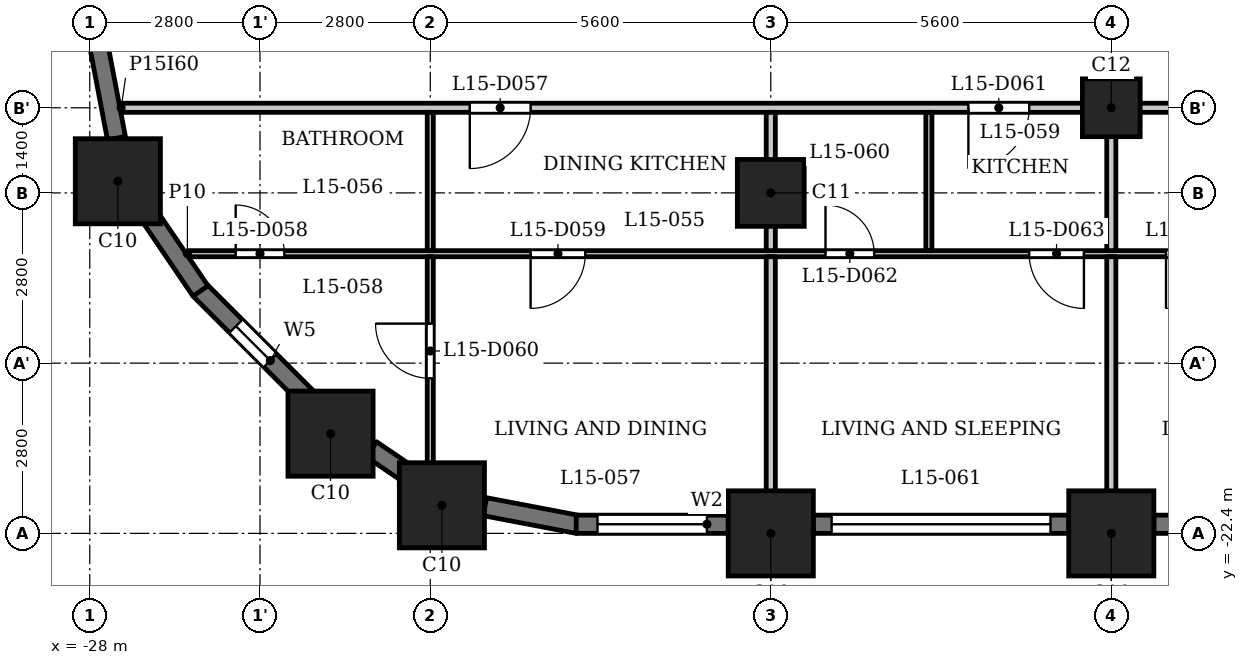
"""IFC4 building model, lengths in metres.
Left out: names, types, materials, properties, quantities, classifications, styles, units other than length and angle.
Written with IfcOpenShell. Run it as: python <this file> out.ifc"""

import sys

from ifc_helpers import new_model, si_unit, direction, frame, frame_2d, origin, origin_2d, place, context, subcontext, project, spatial, rectangle, extrude, element, fill, save


model = new_model("IFC4")
c1 = context("Model", 3, precision=1e-05, world=origin(), true_north=direction((0.0, 1.0)))
c2 = subcontext(c1, "Body", "Model", "MODEL_VIEW")
j1 = project(units=[si_unit("LENGTHUNIT", "METRE"), si_unit("PLANEANGLEUNIT", "RADIAN")], contexts=[c1])
p1 = place(None, origin())
s1 = spatial("IfcSite", under=j1, at=p1, CompositionType="ELEMENT")
p2 = place(p1, origin())
s2 = spatial("IfcBuilding", under=s1, at=p2, CompositionType="ELEMENT")
p3 = place(p2, frame((0.0, 0.0, 62.0)))
s3 = spatial("IfcBuildingStorey", under=s2, at=p3, CompositionType="ELEMENT", Elevation=62.0)
for number, where, z_axis, x_axis in (
    (1, (-22.209, -21.938, 0.0), (0.0, 0.0, 1.0), (1.0, 0.0, 0.0)),
    (2, (-16.8, -22.4, 0.0), (0.0, 0.0, 1.0), (1.0, 0.0, 0.0)),
    (3, (-11.2, -22.4, 0.0), (0.0, 0.0, 1.0), (1.0, 0.0, 0.0)),
    (4, (-27.538, -16.609, 0.0), (0.0, 0.0, 1.0), (1.0, 0.0, 0.0)),
    (5, (-24.04, -20.76, 0.0), (0.0, 0.0, 1.0), (1.0, 0.0, 0.0)),
):
    element("IfcColumn", number, at=place(p3, frame(where, z_axis=z_axis, x_axis=x_axis)), inside=s3, PredefinedType="COLUMN", context=c2, shape_type="SweptSolid", body=[
        extrude(rectangle(XDim=1.4, YDim=1.4, at=origin_2d()), origin(), (0.0, 0.0, 1.0), 3.5),
    ])
p4 = place(p3, frame((-16.8, -16.8, 0.0), z_axis=(0.0, 0.0, 1.0), x_axis=(1.0, 0.0, 0.0)))
e6 = element("IfcColumn", 6, at=p4, inside=s3, PredefinedType="COLUMN", context=c2, shape_type="SweptSolid", body=[
    extrude(rectangle(XDim=1.1, YDim=1.1, at=origin_2d()), origin(), (0.0, 0.0, 1.0), 3.5),
])
p5 = place(p3, frame((-11.2, -15.4, 0.0), z_axis=(0.0, 0.0, 1.0), x_axis=(1.0, 0.0, 0.0)))
e7 = element("IfcColumn", 7, at=p5, inside=s3, PredefinedType="COLUMN", context=c2, shape_type="SweptSolid", body=[
    extrude(rectangle(XDim=0.95, YDim=0.95, at=origin_2d()), origin(), (0.0, 0.0, 1.0), 3.5),
])
p6 = place(p3, frame((-26.197, -18.391, 0.0), z_axis=(0.0, 0.0, 1.0), x_axis=(0.707057949532, -0.707155609469, 0.0)))
e8 = element("IfcWall", 8, at=p6, inside=s3, PredefinedType="SOLIDWALL", context=c2, shape_type="SweptSolid", body=[
    extrude(rectangle(XDim=2.5, YDim=0.3, at=frame_2d((1.25, 0.0))), origin(), (0.0, 0.0, 1.0), 2.35),
])
p7 = place(p6, frame((0.85, 0.0, 0.6)))
e9 = element("IfcOpeningElement", 9, at=p7, cuts=e8, PredefinedType="OPENING", context=c2, shape_type="SweptSolid", body=[
    extrude(rectangle(XDim=0.8, YDim=1.55, at=frame_2d((0.4, 0.775))), frame((0.0, 0.16, 0.0), z_axis=(0.0, -1.0, 0.0), x_axis=(1.0, 0.0, 0.0)), (0.0, 0.0, 1.0), 0.32),
])
p8 = place(p3, frame((-23.368, -21.017, 0.0), z_axis=(0.0, 0.0, 1.0), x_axis=(0.827037530089, -0.562146710232, 0.0)))
e10 = element("IfcWall", 10, at=p8, inside=s3, PredefinedType="SOLIDWALL", context=c2, shape_type="SweptSolid", body=[
    extrude(rectangle(XDim=0.777, YDim=0.3, at=frame_2d((0.388, 0.0))), origin(), (0.0, 0.0, 1.0), 3.2),
])
p9 = place(p3, frame((-21.5, -21.961, 0.0), z_axis=(0.0, 0.0, 1.0), x_axis=(0.982297345734, -0.187328386968, 0.0)))
e11 = element("IfcWall", 11, at=p9, inside=s3, PredefinedType="SOLIDWALL", context=c2, shape_type="SweptSolid", body=[
    extrude(rectangle(XDim=1.556, YDim=0.3, at=frame_2d((0.778, 0.0))), origin(), (0.0, 0.0, 1.0), 2.35),
])
p10 = place(p3, frame((-20.0, -22.25, 0.0), z_axis=(0.0, 0.0, 1.0), x_axis=(1.0, 0.0, 0.0)))
e12 = element("IfcWall", 12, at=p10, inside=s3, PredefinedType="SOLIDWALL", context=c2, shape_type="SweptSolid", body=[
    extrude(rectangle(XDim=2.5, YDim=0.3, at=frame_2d((1.25, 0.0))), origin(), (0.0, 0.0, 1.0), 2.35),
])
p11 = place(p10, frame((0.35, 0.0, 0.9)))
e13 = element("IfcOpeningElement", 13, at=p11, cuts=e12, PredefinedType="OPENING", context=c2, shape_type="SweptSolid", body=[
    extrude(rectangle(XDim=1.8, YDim=1.25, at=frame_2d((0.9, 0.625))), frame((0.0, 0.16, 0.0), z_axis=(0.0, -1.0, 0.0), x_axis=(1.0, 0.0, 0.0)), (0.0, 0.0, 1.0), 0.32),
])
p12 = place(p3, frame((-16.1, -22.25, 0.0), z_axis=(0.0, 0.0, 1.0), x_axis=(1.0, 0.0, 0.0)))
e14 = element("IfcWall", 14, at=p12, inside=s3, PredefinedType="SOLIDWALL", context=c2, shape_type="SweptSolid", body=[
    extrude(rectangle(XDim=4.2, YDim=0.3, at=frame_2d((2.1, 0.0))), origin(), (0.0, 0.0, 1.0), 2.35),
])
p13 = place(p12, frame((0.3, 0.0, 1.2)))
e15 = element("IfcOpeningElement", 15, at=p13, cuts=e14, PredefinedType="OPENING", context=c2, shape_type="SweptSolid", body=[
    extrude(rectangle(XDim=3.6, YDim=0.95, at=frame_2d((1.8, 0.475))), frame((0.0, 0.16, 0.0), z_axis=(0.0, -1.0, 0.0), x_axis=(1.0, 0.0, 0.0)), (0.0, 0.0, 1.0), 0.32),
])
p14 = place(p3, frame((-10.5, -22.25, 0.0), z_axis=(0.0, 0.0, 1.0), x_axis=(1.0, 0.0, 0.0)))
e16 = element("IfcWall", 16, at=p14, inside=s3, PredefinedType="SOLIDWALL", context=c2, shape_type="SweptSolid", body=[
    extrude(rectangle(XDim=4.2, YDim=0.3, at=frame_2d((2.1, 0.0))), origin(), (0.0, 0.0, 1.0), 2.35),
])
p15 = place(p14, frame((0.3, 0.0, 1.2)))
e17 = element("IfcOpeningElement", 17, at=p15, cuts=e16, PredefinedType="OPENING", context=c2, shape_type="SweptSolid", body=[
    extrude(rectangle(XDim=3.6, YDim=0.95, at=frame_2d((1.8, 0.475))), frame((0.0, 0.16, 0.0), z_axis=(0.0, -1.0, 0.0), x_axis=(1.0, 0.0, 0.0)), (0.0, 0.0, 1.0), 0.32),
])
for number, where, z_axis, x_axis in (
    (18, (-27.853, -14.372, 0.0), (0.0, 0.0, 1.0), (0.187, -0.982, 0.0)),
    (19, (-27.053, -17.126, 0.0), (0.0, 0.0, 1.0), (0.562, -0.827, 0.0)),
):
    element("IfcWall", number, at=place(p3, frame(where, z_axis=z_axis, x_axis=x_axis)), inside=s3, PredefinedType="SOLIDWALL", context=c2, shape_type="SweptSolid", body=[
        extrude(rectangle(XDim=1.556, YDim=0.3, at=frame_2d((0.778, 0.0))), origin(), (0.0, 0.0, 1.0), 2.35),
    ])
p16 = place(p3, frame((-26.394, -17.8, 0.0), z_axis=(0.0, 0.0, 1.0), x_axis=(1.0, 0.0, 0.0)))
e20 = element("IfcWall", 20, at=p16, inside=s3, PredefinedType="PARTITIONING", context=c2, shape_type="SweptSolid", body=[
    extrude(rectangle(XDim=53.034, YDim=0.1, at=frame_2d((26.517, 0.0))), origin(), (0.0, 0.0, 1.0), 3.2),
])
p17 = place(p16, frame((0.794, 0.0, 0.0)))
e21 = element("IfcOpeningElement", 21, at=p17, cuts=e20, PredefinedType="OPENING", context=c2, shape_type="SweptSolid", body=[
    extrude(rectangle(XDim=0.8, YDim=2.1, at=frame_2d((0.4, 1.05))), frame((0.0, 0.06, 0.0), z_axis=(0.0, -1.0, 0.0), x_axis=(1.0, 0.0, 0.0)), (0.0, 0.0, 1.0), 0.12),
])
p18 = place(p16, frame((5.644, 0.0, 0.0)))
e22 = element("IfcOpeningElement", 22, at=p18, cuts=e20, PredefinedType="OPENING", context=c2, shape_type="SweptSolid", body=[
    extrude(rectangle(XDim=0.9, YDim=2.1, at=frame_2d((0.45, 1.05))), frame((0.0, 0.06, 0.0), z_axis=(0.0, -1.0, 0.0), x_axis=(1.0, 0.0, 0.0)), (0.0, 0.0, 1.0), 0.12),
])
p19 = place(p16, frame((10.494, 0.0, 0.0)))
e23 = element("IfcOpeningElement", 23, at=p19, cuts=e20, PredefinedType="OPENING", context=c2, shape_type="SweptSolid", body=[
    extrude(rectangle(XDim=0.8, YDim=2.1, at=frame_2d((0.4, 1.05))), frame((0.0, 0.06, 0.0), z_axis=(0.0, -1.0, 0.0), x_axis=(1.0, 0.0, 0.0)), (0.0, 0.0, 1.0), 0.12),
])
p20 = place(p16, frame((13.844, 0.0, 0.0)))
e24 = element("IfcOpeningElement", 24, at=p20, cuts=e20, PredefinedType="OPENING", context=c2, shape_type="SweptSolid", body=[
    extrude(rectangle(XDim=0.9, YDim=2.1, at=frame_2d((0.45, 1.05))), frame((0.0, 0.06, 0.0), z_axis=(0.0, -1.0, 0.0), x_axis=(1.0, 0.0, 0.0)), (0.0, 0.0, 1.0), 0.12),
])
p21 = place(p16, frame((19.344, 0.0, 0.0)))
e25 = element("IfcOpeningElement", 25, at=p21, cuts=e20, PredefinedType="OPENING", context=c2, shape_type="SweptSolid", body=[
    extrude(rectangle(XDim=0.8, YDim=2.1, at=frame_2d((0.4, 1.05))), frame((0.0, 0.06, 0.0), z_axis=(0.0, -1.0, 0.0), x_axis=(1.0, 0.0, 0.0)), (0.0, 0.0, 1.0), 0.12),
])
p22 = place(p16, frame((16.094, 0.0, 0.0)))
e26 = element("IfcOpeningElement", 26, at=p22, cuts=e20, PredefinedType="OPENING", context=c2, shape_type="SweptSolid", body=[
    extrude(rectangle(XDim=0.9, YDim=2.1, at=frame_2d((0.45, 1.05))), frame((0.0, 0.06, 0.0), z_axis=(0.0, -1.0, 0.0), x_axis=(1.0, 0.0, 0.0)), (0.0, 0.0, 1.0), 0.12),
])
p23 = place(p16, frame((24.944, 0.0, 0.0)))
e27 = element("IfcOpeningElement", 27, at=p23, cuts=e20, PredefinedType="OPENING", context=c2, shape_type="SweptSolid", body=[
    extrude(rectangle(XDim=0.8, YDim=2.1, at=frame_2d((0.4, 1.05))), frame((0.0, 0.06, 0.0), z_axis=(0.0, -1.0, 0.0), x_axis=(1.0, 0.0, 0.0)), (0.0, 0.0, 1.0), 0.12),
])
p24 = place(p16, frame((22.444, 0.0, 0.0)))
e28 = element("IfcOpeningElement", 28, at=p24, cuts=e20, PredefinedType="OPENING", context=c2, shape_type="SweptSolid", body=[
    extrude(rectangle(XDim=0.9, YDim=2.1, at=frame_2d((0.45, 1.05))), frame((0.0, 0.06, 0.0), z_axis=(0.0, -1.0, 0.0), x_axis=(1.0, 0.0, 0.0)), (0.0, 0.0, 1.0), 0.12),
])
p25 = place(p16, frame((26.944, 0.0, 0.0)))
e29 = element("IfcOpeningElement", 29, at=p25, cuts=e20, PredefinedType="OPENING", context=c2, shape_type="SweptSolid", body=[
    extrude(rectangle(XDim=0.8, YDim=2.1, at=frame_2d((0.4, 1.05))), frame((0.0, 0.06, 0.0), z_axis=(0.0, -1.0, 0.0), x_axis=(1.0, 0.0, 0.0)), (0.0, 0.0, 1.0), 0.12),
])
p26 = place(p16, frame((29.794, 0.0, 0.0)))
e30 = element("IfcOpeningElement", 30, at=p26, cuts=e20, PredefinedType="OPENING", context=c2, shape_type="SweptSolid", body=[
    extrude(rectangle(XDim=0.9, YDim=2.1, at=frame_2d((0.45, 1.05))), frame((0.0, 0.06, 0.0), z_axis=(0.0, -1.0, 0.0), x_axis=(1.0, 0.0, 0.0)), (0.0, 0.0, 1.0), 0.12),
])
p27 = place(p16, frame((33.394, 0.0, 0.0)))
e31 = element("IfcOpeningElement", 31, at=p27, cuts=e20, PredefinedType="OPENING", context=c2, shape_type="SweptSolid", body=[
    extrude(rectangle(XDim=0.9, YDim=2.1, at=frame_2d((0.45, 1.05))), frame((0.0, 0.06, 0.0), z_axis=(0.0, -1.0, 0.0), x_axis=(1.0, 0.0, 0.0)), (0.0, 0.0, 1.0), 0.12),
])
p28 = place(p16, frame((34.944, 0.0, 0.0)))
e32 = element("IfcOpeningElement", 32, at=p28, cuts=e20, PredefinedType="OPENING", context=c2, shape_type="SweptSolid", body=[
    extrude(rectangle(XDim=0.9, YDim=2.1, at=frame_2d((0.45, 1.05))), frame((0.0, 0.06, 0.0), z_axis=(0.0, -1.0, 0.0), x_axis=(1.0, 0.0, 0.0)), (0.0, 0.0, 1.0), 0.12),
])
p29 = place(p16, frame((38.144, 0.0, 0.0)))
e33 = element("IfcOpeningElement", 33, at=p29, cuts=e20, PredefinedType="OPENING", context=c2, shape_type="SweptSolid", body=[
    extrude(rectangle(XDim=0.8, YDim=2.1, at=frame_2d((0.4, 1.05))), frame((0.0, 0.06, 0.0), z_axis=(0.0, -1.0, 0.0), x_axis=(1.0, 0.0, 0.0)), (0.0, 0.0, 1.0), 0.12),
])
p30 = place(p16, frame((40.244, 0.0, 0.0)))
e34 = element("IfcOpeningElement", 34, at=p30, cuts=e20, PredefinedType="OPENING", context=c2, shape_type="SweptSolid", body=[
    extrude(rectangle(XDim=0.9, YDim=2.1, at=frame_2d((0.45, 1.05))), frame((0.0, 0.06, 0.0), z_axis=(0.0, -1.0, 0.0), x_axis=(1.0, 0.0, 0.0)), (0.0, 0.0, 1.0), 0.12),
])
p31 = place(p16, frame((49.362, 0.0, 0.0)))
e35 = element("IfcOpeningElement", 35, at=p31, cuts=e20, PredefinedType="OPENING", context=c2, shape_type="SweptSolid", body=[
    extrude(rectangle(XDim=0.8, YDim=2.1, at=frame_2d((0.4, 1.05))), frame((0.0, 0.06, 0.0), z_axis=(0.0, -1.0, 0.0), x_axis=(1.0, 0.0, 0.0)), (0.0, 0.0, 1.0), 0.12),
])
p32 = place(p16, frame((45.094, 0.0, 0.0)))
e36 = element("IfcOpeningElement", 36, at=p32, cuts=e20, PredefinedType="OPENING", context=c2, shape_type="SweptSolid", body=[
    extrude(rectangle(XDim=0.9, YDim=2.1, at=frame_2d((0.45, 1.05))), frame((0.0, 0.06, 0.0), z_axis=(0.0, -1.0, 0.0), x_axis=(1.0, 0.0, 0.0)), (0.0, 0.0, 1.0), 0.12),
])
p33 = place(p3, frame((-27.484, -15.4, 0.0), z_axis=(0.0, 0.0, 1.0), x_axis=(1.0, 0.0, 0.0)))
e37 = element("IfcWall", 37, at=p33, inside=s3, PredefinedType="PARTITIONING", context=c2, shape_type="SweptSolid", body=[
    extrude(rectangle(XDim=54.968, YDim=0.15, at=frame_2d((27.484, 0.0))), origin(), (0.0, 0.0, 1.0), 3.2),
])
p34 = place(p33, frame((5.734, 0.0, 0.0)))
e38 = element("IfcOpeningElement", 38, at=p34, cuts=e37, PredefinedType="OPENING", context=c2, shape_type="SweptSolid", body=[
    extrude(rectangle(XDim=1.0, YDim=2.1, at=frame_2d((0.5, 1.05))), frame((0.0, 0.085, 0.0), z_axis=(0.0, -1.0, 0.0), x_axis=(1.0, 0.0, 0.0)), (0.0, 0.0, 1.0), 0.17),
])
p35 = place(p33, frame((13.934, 0.0, 0.0)))
e39 = element("IfcOpeningElement", 39, at=p35, cuts=e37, PredefinedType="OPENING", context=c2, shape_type="SweptSolid", body=[
    extrude(rectangle(XDim=1.0, YDim=2.1, at=frame_2d((0.5, 1.05))), frame((0.0, 0.085, 0.0), z_axis=(0.0, -1.0, 0.0), x_axis=(1.0, 0.0, 0.0)), (0.0, 0.0, 1.0), 0.17),
])
p36 = place(p33, frame((18.184, 0.0, 0.0)))
e40 = element("IfcOpeningElement", 40, at=p36, cuts=e37, PredefinedType="OPENING", context=c2, shape_type="SweptSolid", body=[
    extrude(rectangle(XDim=1.0, YDim=2.1, at=frame_2d((0.5, 1.05))), frame((0.0, 0.085, 0.0), z_axis=(0.0, -1.0, 0.0), x_axis=(1.0, 0.0, 0.0)), (0.0, 0.0, 1.0), 0.17),
])
p37 = place(p33, frame((22.534, 0.0, 0.0)))
e41 = element("IfcOpeningElement", 41, at=p37, cuts=e37, PredefinedType="OPENING", context=c2, shape_type="SweptSolid", body=[
    extrude(rectangle(XDim=1.0, YDim=2.1, at=frame_2d((0.5, 1.05))), frame((0.0, 0.085, 0.0), z_axis=(0.0, -1.0, 0.0), x_axis=(1.0, 0.0, 0.0)), (0.0, 0.0, 1.0), 0.17),
])
p38 = place(p33, frame((36.984, 0.0, 0.0)))
e42 = element("IfcOpeningElement", 42, at=p38, cuts=e37, PredefinedType="OPENING", context=c2, shape_type="SweptSolid", body=[
    extrude(rectangle(XDim=1.0, YDim=2.1, at=frame_2d((0.5, 1.05))), frame((0.0, 0.085, 0.0), z_axis=(0.0, -1.0, 0.0), x_axis=(1.0, 0.0, 0.0)), (0.0, 0.0, 1.0), 0.17),
])
p39 = place(p33, frame((42.334, 0.0, 0.0)))
e43 = element("IfcOpeningElement", 43, at=p39, cuts=e37, PredefinedType="OPENING", context=c2, shape_type="SweptSolid", body=[
    extrude(rectangle(XDim=1.0, YDim=2.1, at=frame_2d((0.5, 1.05))), frame((0.0, 0.085, 0.0), z_axis=(0.0, -1.0, 0.0), x_axis=(1.0, 0.0, 0.0)), (0.0, 0.0, 1.0), 0.17),
])
p40 = place(p33, frame((45.184, 0.0, 0.0)))
e44 = element("IfcOpeningElement", 44, at=p40, cuts=e37, PredefinedType="OPENING", context=c2, shape_type="SweptSolid", body=[
    extrude(rectangle(XDim=1.0, YDim=2.1, at=frame_2d((0.5, 1.05))), frame((0.0, 0.085, 0.0), z_axis=(0.0, -1.0, 0.0), x_axis=(1.0, 0.0, 0.0)), (0.0, 0.0, 1.0), 0.17),
])
p41 = place(p3, frame((-22.4, -21.72, 0.0), z_axis=(0.0, 0.0, 1.0), x_axis=(0.0, 1.0, 0.0)))
e45 = element("IfcWall", 45, at=p41, inside=s3, PredefinedType="PARTITIONING", context=c2, shape_type="SweptSolid", body=[
    extrude(rectangle(XDim=3.87, YDim=0.1, at=frame_2d((1.935, 0.0))), origin(), (0.0, 0.0, 1.0), 3.2),
])
p42 = place(p41, frame((1.87, 0.0, 0.0)))
e46 = element("IfcOpeningElement", 46, at=p42, cuts=e45, PredefinedType="OPENING", context=c2, shape_type="SweptSolid", body=[
    extrude(rectangle(XDim=0.9, YDim=2.1, at=frame_2d((0.45, 1.05))), frame((0.0, 0.06, 0.0), z_axis=(0.0, -1.0, 0.0), x_axis=(1.0, 0.0, 0.0)), (0.0, 0.0, 1.0), 0.12),
])
p43 = place(p3, frame((-22.4, -17.75, 0.0), z_axis=(0.0, 0.0, 1.0), x_axis=(0.0, 1.0, 0.0)))
e47 = element("IfcWall", 47, at=p43, inside=s3, PredefinedType="PARTITIONING", context=c2, shape_type="SweptSolid", body=[
    extrude(rectangle(XDim=2.275, YDim=0.1, at=frame_2d((1.137, 0.0))), origin(), (0.0, 0.0, 1.0), 3.2),
])
p44 = place(p3, frame((-16.8, -23.08, 0.0), z_axis=(0.0, 0.0, 1.0), x_axis=(0.0, 1.0, 0.0)))
e48 = element("IfcWall", 48, at=p44, inside=s3, PredefinedType="PARTITIONING", context=c2, shape_type="SweptSolid", body=[
    extrude(rectangle(XDim=5.23, YDim=0.15, at=frame_2d((2.615, 0.0))), origin(), (0.0, 0.0, 1.0), 3.2),
])
p45 = place(p3, frame((-16.8, -17.75, 0.0), z_axis=(0.0, 0.0, 1.0), x_axis=(0.0, 1.0, 0.0)))
e49 = element("IfcWall", 49, at=p45, inside=s3, PredefinedType="PARTITIONING", context=c2, shape_type="SweptSolid", body=[
    extrude(rectangle(XDim=2.275, YDim=0.15, at=frame_2d((1.137, 0.0))), origin(), (0.0, 0.0, 1.0), 3.2),
])
p46 = place(p3, frame((-14.2, -17.75, 0.0), z_axis=(0.0, 0.0, 1.0), x_axis=(0.0, 1.0, 0.0)))
e50 = element("IfcWall", 50, at=p46, inside=s3, PredefinedType="PARTITIONING", context=c2, shape_type="SweptSolid", body=[
    extrude(rectangle(XDim=2.275, YDim=0.1, at=frame_2d((1.137, 0.0))), origin(), (0.0, 0.0, 1.0), 3.2),
])
p47 = place(p3, frame((-11.2, -23.08, 0.0), z_axis=(0.0, 0.0, 1.0), x_axis=(0.0, 1.0, 0.0)))
e51 = element("IfcWall", 51, at=p47, inside=s3, PredefinedType="PARTITIONING", context=c2, shape_type="SweptSolid", body=[
    extrude(rectangle(XDim=5.23, YDim=0.15, at=frame_2d((2.615, 0.0))), origin(), (0.0, 0.0, 1.0), 3.2),
])
p48 = place(p3, frame((-11.2, -17.75, 0.0), z_axis=(0.0, 0.0, 1.0), x_axis=(0.0, 1.0, 0.0)))
e52 = element("IfcWall", 52, at=p48, inside=s3, PredefinedType="PARTITIONING", context=c2, shape_type="SweptSolid", body=[
    extrude(rectangle(XDim=2.275, YDim=0.15, at=frame_2d((1.137, 0.0))), origin(), (0.0, 0.0, 1.0), 3.2),
])
p49 = place(p34, origin())
e53 = element("IfcDoor", 53, at=p49, inside=s3, OperationType="SINGLE_SWING_LEFT", PredefinedType="DOOR", context=c2, shape_type="SweptSolid", body=[
    extrude(rectangle(XDim=1.0, YDim=2.1, at=frame_2d((0.5, 1.05))), frame((0.0, 0.025, 0.0), z_axis=(0.0, -1.0, 0.0), x_axis=(1.0, 0.0, 0.0)), (0.0, 0.0, 1.0), 0.05),
])
fill(e38, e53)
p50 = place(p17, origin())
e54 = element("IfcDoor", 54, at=p50, inside=s3, OperationType="SINGLE_SWING_RIGHT", PredefinedType="DOOR", context=c2, shape_type="SweptSolid", body=[
    extrude(rectangle(XDim=0.8, YDim=2.1, at=frame_2d((0.4, 1.05))), frame((0.0, 0.025, 0.0), z_axis=(0.0, -1.0, 0.0), x_axis=(1.0, 0.0, 0.0)), (0.0, 0.0, 1.0), 0.05),
])
fill(e21, e54)
p51 = place(p18, origin())
e55 = element("IfcDoor", 55, at=p51, inside=s3, OperationType="SINGLE_SWING_LEFT", PredefinedType="DOOR", context=c2, shape_type="SweptSolid", body=[
    extrude(rectangle(XDim=0.9, YDim=2.1, at=frame_2d((0.45, 1.05))), frame((0.0, 0.025, 0.0), z_axis=(0.0, -1.0, 0.0), x_axis=(1.0, 0.0, 0.0)), (0.0, 0.0, 1.0), 0.05),
])
fill(e22, e55)
p52 = place(p42, origin())
e56 = element("IfcDoor", 56, at=p52, inside=s3, OperationType="SINGLE_SWING_LEFT", PredefinedType="DOOR", context=c2, shape_type="SweptSolid", body=[
    extrude(rectangle(XDim=0.9, YDim=2.1, at=frame_2d((0.45, 1.05))), frame((0.0, 0.025, 0.0), z_axis=(0.0, -1.0, 0.0), x_axis=(1.0, 0.0, 0.0)), (0.0, 0.0, 1.0), 0.05),
])
fill(e46, e56)
p53 = place(p35, origin())
e57 = element("IfcDoor", 57, at=p53, inside=s3, OperationType="SINGLE_SWING_LEFT", PredefinedType="DOOR", context=c2, shape_type="SweptSolid", body=[
    extrude(rectangle(XDim=1.0, YDim=2.1, at=frame_2d((0.5, 1.05))), frame((0.0, 0.025, 0.0), z_axis=(0.0, -1.0, 0.0), x_axis=(1.0, 0.0, 0.0)), (0.0, 0.0, 1.0), 0.05),
])
fill(e39, e57)
p54 = place(p19, origin())
e58 = element("IfcDoor", 58, at=p54, inside=s3, OperationType="SINGLE_SWING_RIGHT", PredefinedType="DOOR", context=c2, shape_type="SweptSolid", body=[
    extrude(rectangle(XDim=0.8, YDim=2.1, at=frame_2d((0.4, 1.05))), frame((0.0, 0.025, 0.0), z_axis=(0.0, -1.0, 0.0), x_axis=(1.0, 0.0, 0.0)), (0.0, 0.0, 1.0), 0.05),
])
fill(e23, e58)
p55 = place(p20, origin())
e59 = element("IfcDoor", 59, at=p55, inside=s3, OperationType="SINGLE_SWING_RIGHT", PredefinedType="DOOR", context=c2, shape_type="SweptSolid", body=[
    extrude(rectangle(XDim=0.9, YDim=2.1, at=frame_2d((0.45, 1.05))), frame((0.0, 0.025, 0.0), z_axis=(0.0, -1.0, 0.0), x_axis=(1.0, 0.0, 0.0)), (0.0, 0.0, 1.0), 0.05),
])
fill(e24, e59)
p56 = place(p22, origin())
e60 = element("IfcDoor", 60, at=p56, inside=s3, OperationType="SINGLE_SWING_LEFT", PredefinedType="DOOR", context=c2, shape_type="SweptSolid", body=[
    extrude(rectangle(XDim=0.9, YDim=2.1, at=frame_2d((0.45, 1.05))), frame((0.0, 0.025, 0.0), z_axis=(0.0, -1.0, 0.0), x_axis=(1.0, 0.0, 0.0)), (0.0, 0.0, 1.0), 0.05),
])
fill(e26, e60)
p57 = place(p7, origin())
e61 = element("IfcWindow", 61, at=p57, inside=s3, PartitioningType="SINGLE_PANEL", PredefinedType="WINDOW", context=c2, shape_type="SweptSolid", body=[
    extrude(rectangle(XDim=0.8, YDim=1.55, at=frame_2d((0.4, 0.775))), frame((0.0, 0.03, 0.0), z_axis=(0.0, -1.0, 0.0), x_axis=(1.0, 0.0, 0.0)), (0.0, 0.0, 1.0), 0.06),
])
fill(e9, e61)
p58 = place(p11, origin())
e62 = element("IfcWindow", 62, at=p58, inside=s3, PartitioningType="SINGLE_PANEL", PredefinedType="WINDOW", context=c2, shape_type="SweptSolid", body=[
    extrude(rectangle(XDim=1.8, YDim=1.25, at=frame_2d((0.9, 0.625))), frame((0.0, 0.03, 0.0), z_axis=(0.0, -1.0, 0.0), x_axis=(1.0, 0.0, 0.0)), (0.0, 0.0, 1.0), 0.06),
])
fill(e13, e62)
p59 = place(p13, origin())
e63 = element("IfcWindow", 63, at=p59, inside=s3, PartitioningType="SINGLE_PANEL", PredefinedType="WINDOW", context=c2, shape_type="SweptSolid", body=[
    extrude(rectangle(XDim=3.6, YDim=0.95, at=frame_2d((1.8, 0.475))), frame((0.0, 0.03, 0.0), z_axis=(0.0, -1.0, 0.0), x_axis=(1.0, 0.0, 0.0)), (0.0, 0.0, 1.0), 0.06),
])
fill(e15, e63)
save(model, sys.argv[1])
